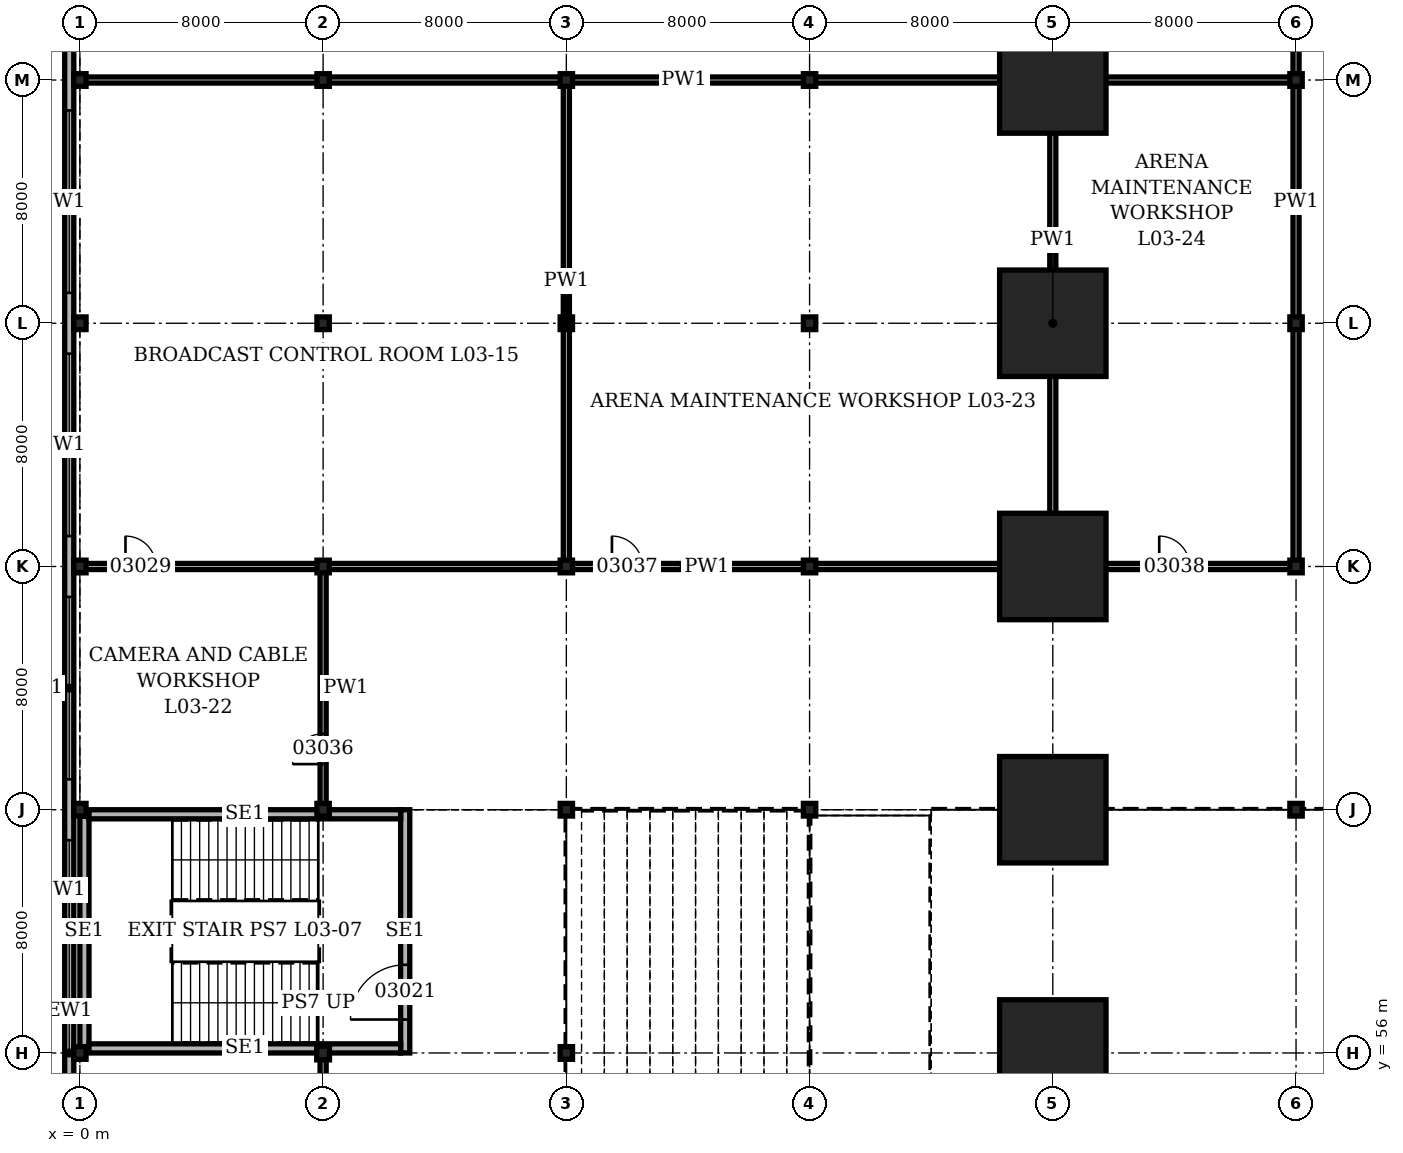
"""IFC4 building model, lengths in metres.
Left out: names, types, materials, properties, quantities, classifications, styles, units other than length and angle.
Written with IfcOpenShell. Run it as: python <this file> out.ifc"""

import sys

from ifc_helpers import new_model, si_unit, direction, frame, frame_2d, origin, origin_2d, place, context, subcontext, project, spatial, rectangle, hollow_rectangle, i_section, extrude, element, fill, save


model = new_model("IFC4")
c1 = context("Model", 3, precision=1e-05, world=origin(), true_north=direction((0.0, 1.0)))
c2 = subcontext(c1, "Body", "Model", "MODEL_VIEW")
j1 = project(units=[si_unit("LENGTHUNIT", "METRE"), si_unit("PLANEANGLEUNIT", "RADIAN")], contexts=[c1])
p1 = place(None, origin())
s1 = spatial("IfcSite", under=j1, at=p1, CompositionType="ELEMENT")
p2 = place(p1, origin())
s2 = spatial("IfcBuilding", under=s1, at=p2, CompositionType="ELEMENT")
p3 = place(p2, frame((0.0, 0.0, 14.9)))
s3 = spatial("IfcBuildingStorey", under=s2, at=p3, CompositionType="ELEMENT", Elevation=14.9)
for number, where, z_axis, x_axis in (
    (1, (0.0, 56.0, 0.0), (0.0, 0.0, 1.0), (1.0, 0.0, 0.0)),
    (2, (0.0, 64.0, 0.0), (0.0, 0.0, 1.0), (1.0, 0.0, 0.0)),
    (3, (0.0, 72.0, 0.0), (0.0, 0.0, 1.0), (1.0, 0.0, 0.0)),
    (4, (0.0, 80.0, 0.0), (0.0, 0.0, 1.0), (1.0, 0.0, 0.0)),
    (5, (0.0, 88.0, 0.0), (0.0, 0.0, 1.0), (1.0, 0.0, 0.0)),
):
    element("IfcColumn", number, at=place(p3, frame(where, z_axis=z_axis, x_axis=x_axis)), inside=s3, PredefinedType="COLUMN", context=c2, shape_type="SweptSolid", body=[
        extrude(i_section(OverallWidth=0.406, OverallDepth=0.417, WebThickness=0.03, FlangeThickness=0.048, at=origin_2d()), origin(), (0.0, 0.0, 1.0), 5.0),
    ])
p4 = place(p3, frame((8.0, 56.0, 0.0), z_axis=(0.0, 0.0, 1.0), x_axis=(1.0, 0.0, 0.0)))
e6 = element("IfcColumn", 6, at=p4, inside=s3, PredefinedType="COLUMN", context=c2, shape_type="SweptSolid", body=[
    extrude(i_section(OverallWidth=0.419, OverallDepth=0.455, WebThickness=0.042, FlangeThickness=0.068, at=origin_2d()), origin(), (0.0, 0.0, 1.0), 5.0),
])
for number, where, z_axis, x_axis in (
    (7, (8.0, 64.0, 0.0), (0.0, 0.0, 1.0), (1.0, 0.0, 0.0)),
    (8, (8.0, 72.0, 0.0), (0.0, 0.0, 1.0), (1.0, 0.0, 0.0)),
    (9, (8.0, 80.0, 0.0), (0.0, 0.0, 1.0), (1.0, 0.0, 0.0)),
    (10, (8.0, 88.0, 0.0), (0.0, 0.0, 1.0), (1.0, 0.0, 0.0)),
    (11, (16.0, 56.0, 0.0), (0.0, 0.0, 1.0), (1.0, 0.0, 0.0)),
    (12, (16.0, 64.0, 0.0), (0.0, 0.0, 1.0), (1.0, 0.0, 0.0)),
    (13, (16.0, 72.0, 0.0), (0.0, 0.0, 1.0), (1.0, 0.0, 0.0)),
    (14, (16.0, 80.0, 0.0), (0.0, 0.0, 1.0), (1.0, 0.0, 0.0)),
    (15, (16.0, 88.0, 0.0), (0.0, 0.0, 1.0), (1.0, 0.0, 0.0)),
    (16, (24.0, 64.0, 0.0), (0.0, 0.0, 1.0), (1.0, 0.0, 0.0)),
    (17, (24.0, 72.0, 0.0), (0.0, 0.0, 1.0), (1.0, 0.0, 0.0)),
    (18, (24.0, 80.0, 0.0), (0.0, 0.0, 1.0), (1.0, 0.0, 0.0)),
    (19, (24.0, 88.0, 0.0), (0.0, 0.0, 1.0), (1.0, 0.0, 0.0)),
):
    element("IfcColumn", number, at=place(p3, frame(where, z_axis=z_axis, x_axis=x_axis)), inside=s3, PredefinedType="COLUMN", context=c2, shape_type="SweptSolid", body=[
        extrude(i_section(OverallWidth=0.406, OverallDepth=0.417, WebThickness=0.03, FlangeThickness=0.048, at=origin_2d()), origin(), (0.0, 0.0, 1.0), 5.0),
    ])
for number, where, z_axis, x_axis in (
    (20, (32.0, 56.0, 0.0), (0.0, 0.0, 1.0), (1.0, 0.0, 0.0)),
    (21, (32.0, 64.0, 0.0), (0.0, 0.0, 1.0), (1.0, 0.0, 0.0)),
    (22, (32.0, 72.0, 0.0), (0.0, 0.0, 1.0), (1.0, 0.0, 0.0)),
    (23, (32.0, 80.0, 0.0), (0.0, 0.0, 1.0), (1.0, 0.0, 0.0)),
    (24, (32.0, 88.0, 0.0), (0.0, 0.0, 1.0), (1.0, 0.0, 0.0)),
):
    element("IfcColumn", number, at=place(p3, frame(where, z_axis=z_axis, x_axis=x_axis)), inside=s3, PredefinedType="COLUMN", context=c2, shape_type="SweptSolid", body=[
        extrude(hollow_rectangle(XDim=3.5, YDim=3.5, WallThickness=0.5, at=origin_2d()), origin(), (0.0, 0.0, 1.0), 5.0),
    ])
for number, where, z_axis, x_axis in (
    (25, (40.0, 64.0, 0.0), (0.0, 0.0, 1.0), (1.0, 0.0, 0.0)),
    (26, (40.0, 72.0, 0.0), (0.0, 0.0, 1.0), (1.0, 0.0, 0.0)),
    (27, (40.0, 80.0, 0.0), (0.0, 0.0, 1.0), (1.0, 0.0, 0.0)),
    (28, (40.0, 88.0, 0.0), (0.0, 0.0, 1.0), (1.0, 0.0, 0.0)),
):
    element("IfcColumn", number, at=place(p3, frame(where, z_axis=z_axis, x_axis=x_axis)), inside=s3, PredefinedType="COLUMN", context=c2, shape_type="SweptSolid", body=[
        extrude(i_section(OverallWidth=0.406, OverallDepth=0.417, WebThickness=0.03, FlangeThickness=0.048, at=origin_2d()), origin(), (0.0, 0.0, 1.0), 5.0),
    ])
p5 = place(p3, frame((-0.35, 112.35, 0.0), z_axis=(0.0, 0.0, 1.0), x_axis=(0.0, -1.0, 0.0)))
e29 = element("IfcWall", 29, at=p5, inside=s3, PredefinedType="SOLIDWALL", context=c2, shape_type="SweptSolid", body=[
    extrude(rectangle(XDim=112.7, YDim=0.3, at=frame_2d((56.35, 0.0))), origin(), (0.0, 0.0, 1.0), 5.0),
])
p6 = place(p5, frame((1.35, 0.0, 1.0)))
e30 = element("IfcOpeningElement", 30, at=p6, cuts=e29, PredefinedType="OPENING", context=c2, shape_type="SweptSolid", body=[
    extrude(rectangle(XDim=6.0, YDim=1.5, at=frame_2d((3.0, 0.75))), frame((0.0, 0.16, 0.0), z_axis=(0.0, -1.0, 0.0), x_axis=(1.0, 0.0, 0.0)), (0.0, 0.0, 1.0), 0.32),
])
p7 = place(p5, frame((9.35, 0.0, 1.0)))
e31 = element("IfcOpeningElement", 31, at=p7, cuts=e29, PredefinedType="OPENING", context=c2, shape_type="SweptSolid", body=[
    extrude(rectangle(XDim=6.0, YDim=1.5, at=frame_2d((3.0, 0.75))), frame((0.0, 0.16, 0.0), z_axis=(0.0, -1.0, 0.0), x_axis=(1.0, 0.0, 0.0)), (0.0, 0.0, 1.0), 0.32),
])
p8 = place(p5, frame((17.35, 0.0, 1.0)))
e32 = element("IfcOpeningElement", 32, at=p8, cuts=e29, PredefinedType="OPENING", context=c2, shape_type="SweptSolid", body=[
    extrude(rectangle(XDim=6.0, YDim=1.5, at=frame_2d((3.0, 0.75))), frame((0.0, 0.16, 0.0), z_axis=(0.0, -1.0, 0.0), x_axis=(1.0, 0.0, 0.0)), (0.0, 0.0, 1.0), 0.32),
])
p9 = place(p5, frame((25.35, 0.0, 1.0)))
e33 = element("IfcOpeningElement", 33, at=p9, cuts=e29, PredefinedType="OPENING", context=c2, shape_type="SweptSolid", body=[
    extrude(rectangle(XDim=6.0, YDim=1.5, at=frame_2d((3.0, 0.75))), frame((0.0, 0.16, 0.0), z_axis=(0.0, -1.0, 0.0), x_axis=(1.0, 0.0, 0.0)), (0.0, 0.0, 1.0), 0.32),
])
p10 = place(p5, frame((33.35, 0.0, 1.0)))
e34 = element("IfcOpeningElement", 34, at=p10, cuts=e29, PredefinedType="OPENING", context=c2, shape_type="SweptSolid", body=[
    extrude(rectangle(XDim=6.0, YDim=1.5, at=frame_2d((3.0, 0.75))), frame((0.0, 0.16, 0.0), z_axis=(0.0, -1.0, 0.0), x_axis=(1.0, 0.0, 0.0)), (0.0, 0.0, 1.0), 0.32),
])
p11 = place(p5, frame((41.35, 0.0, 1.0)))
e35 = element("IfcOpeningElement", 35, at=p11, cuts=e29, PredefinedType="OPENING", context=c2, shape_type="SweptSolid", body=[
    extrude(rectangle(XDim=6.0, YDim=1.5, at=frame_2d((3.0, 0.75))), frame((0.0, 0.16, 0.0), z_axis=(0.0, -1.0, 0.0), x_axis=(1.0, 0.0, 0.0)), (0.0, 0.0, 1.0), 0.32),
])
p12 = place(p5, frame((49.35, 0.0, 1.0)))
e36 = element("IfcOpeningElement", 36, at=p12, cuts=e29, PredefinedType="OPENING", context=c2, shape_type="SweptSolid", body=[
    extrude(rectangle(XDim=6.0, YDim=1.5, at=frame_2d((3.0, 0.75))), frame((0.0, 0.16, 0.0), z_axis=(0.0, -1.0, 0.0), x_axis=(1.0, 0.0, 0.0)), (0.0, 0.0, 1.0), 0.32),
])
p13 = place(p5, frame((57.35, 0.0, 1.0)))
e37 = element("IfcOpeningElement", 37, at=p13, cuts=e29, PredefinedType="OPENING", context=c2, shape_type="SweptSolid", body=[
    extrude(rectangle(XDim=6.0, YDim=1.5, at=frame_2d((3.0, 0.75))), frame((0.0, 0.16, 0.0), z_axis=(0.0, -1.0, 0.0), x_axis=(1.0, 0.0, 0.0)), (0.0, 0.0, 1.0), 0.32),
])
p14 = place(p5, frame((65.35, 0.0, 1.0)))
e38 = element("IfcOpeningElement", 38, at=p14, cuts=e29, PredefinedType="OPENING", context=c2, shape_type="SweptSolid", body=[
    extrude(rectangle(XDim=6.0, YDim=1.5, at=frame_2d((3.0, 0.75))), frame((0.0, 0.16, 0.0), z_axis=(0.0, -1.0, 0.0), x_axis=(1.0, 0.0, 0.0)), (0.0, 0.0, 1.0), 0.32),
])
p15 = place(p5, frame((73.35, 0.0, 1.0)))
e39 = element("IfcOpeningElement", 39, at=p15, cuts=e29, PredefinedType="OPENING", context=c2, shape_type="SweptSolid", body=[
    extrude(rectangle(XDim=6.0, YDim=1.5, at=frame_2d((3.0, 0.75))), frame((0.0, 0.16, 0.0), z_axis=(0.0, -1.0, 0.0), x_axis=(1.0, 0.0, 0.0)), (0.0, 0.0, 1.0), 0.32),
])
p16 = place(p5, frame((81.35, 0.0, 1.0)))
e40 = element("IfcOpeningElement", 40, at=p16, cuts=e29, PredefinedType="OPENING", context=c2, shape_type="SweptSolid", body=[
    extrude(rectangle(XDim=6.0, YDim=1.5, at=frame_2d((3.0, 0.75))), frame((0.0, 0.16, 0.0), z_axis=(0.0, -1.0, 0.0), x_axis=(1.0, 0.0, 0.0)), (0.0, 0.0, 1.0), 0.32),
])
p17 = place(p5, frame((89.35, 0.0, 1.0)))
e41 = element("IfcOpeningElement", 41, at=p17, cuts=e29, PredefinedType="OPENING", context=c2, shape_type="SweptSolid", body=[
    extrude(rectangle(XDim=6.0, YDim=1.5, at=frame_2d((3.0, 0.75))), frame((0.0, 0.16, 0.0), z_axis=(0.0, -1.0, 0.0), x_axis=(1.0, 0.0, 0.0)), (0.0, 0.0, 1.0), 0.32),
])
p18 = place(p5, frame((97.35, 0.0, 1.0)))
e42 = element("IfcOpeningElement", 42, at=p18, cuts=e29, PredefinedType="OPENING", context=c2, shape_type="SweptSolid", body=[
    extrude(rectangle(XDim=6.0, YDim=1.5, at=frame_2d((3.0, 0.75))), frame((0.0, 0.16, 0.0), z_axis=(0.0, -1.0, 0.0), x_axis=(1.0, 0.0, 0.0)), (0.0, 0.0, 1.0), 0.32),
])
p19 = place(p5, frame((105.35, 0.0, 1.0)))
e43 = element("IfcOpeningElement", 43, at=p19, cuts=e29, PredefinedType="OPENING", context=c2, shape_type="SweptSolid", body=[
    extrude(rectangle(XDim=6.0, YDim=1.5, at=frame_2d((3.0, 0.75))), frame((0.0, 0.16, 0.0), z_axis=(0.0, -1.0, 0.0), x_axis=(1.0, 0.0, 0.0)), (0.0, 0.0, 1.0), 0.32),
])
p20 = place(p3, frame((0.15, 56.208, 0.0), z_axis=(0.0, 0.0, 1.0), x_axis=(0.0, 1.0, 0.0)))
e44 = element("IfcWall", 44, at=p20, inside=s3, PredefinedType="SOLIDWALL", context=c2, shape_type="SweptSolid", body=[
    extrude(rectangle(XDim=7.583, YDim=0.3, at=frame_2d((3.792, 0.0))), origin(), (0.0, 0.0, 1.0), 4.8),
])
p21 = place(p3, frame((10.7, 56.0, 0.0), z_axis=(0.0, 0.0, 1.0), x_axis=(0.0, 1.0, 0.0)))
e45 = element("IfcWall", 45, at=p21, inside=s3, PredefinedType="SOLIDWALL", context=c2, shape_type="SweptSolid", body=[
    extrude(rectangle(XDim=8.0, YDim=0.3, at=frame_2d((4.0, 0.0))), origin(), (0.0, 0.0, 1.0), 4.8),
])
p22 = place(p21, frame((1.1, 0.0, 0.0)))
e46 = element("IfcOpeningElement", 46, at=p22, cuts=e45, PredefinedType="OPENING", context=c2, shape_type="SweptSolid", body=[
    extrude(rectangle(XDim=1.8, YDim=2.1, at=frame_2d((0.9, 1.05))), frame((0.0, 0.16, 0.0), z_axis=(0.0, -1.0, 0.0), x_axis=(1.0, 0.0, 0.0)), (0.0, 0.0, 1.0), 0.32),
])
for number, where, z_axis, x_axis in (
    (47, (0.3, 56.15, 0.0), (0.0, 0.0, 1.0), (1.0, 0.0, 0.0)),
    (48, (0.3, 63.85, 0.0), (0.0, 0.0, 1.0), (1.0, 0.0, 0.0)),
):
    element("IfcWall", number, at=place(p3, frame(where, z_axis=z_axis, x_axis=x_axis)), inside=s3, PredefinedType="SOLIDWALL", context=c2, shape_type="SweptSolid", body=[
        extrude(rectangle(XDim=10.25, YDim=0.3, at=frame_2d((5.125, 0.0))), origin(), (0.0, 0.0, 1.0), 4.8),
    ])
p23 = place(p3, frame((-0.15, 72.0, 0.0), z_axis=(0.0, 0.0, 1.0), x_axis=(1.0, 0.0, 0.0)))
e49 = element("IfcWall", 49, at=p23, inside=s3, PredefinedType="PARTITIONING", context=c2, shape_type="SweptSolid", body=[
    extrude(rectangle(XDim=40.05, YDim=0.2, at=frame_2d((20.025, 0.0))), origin(), (0.0, 0.0, 1.0), 4.028),
])
p24 = place(p23, frame((1.65, 0.0, 0.0)))
e50 = element("IfcOpeningElement", 50, at=p24, cuts=e49, PredefinedType="OPENING", context=c2, shape_type="SweptSolid", body=[
    extrude(rectangle(XDim=1.0, YDim=2.1, at=frame_2d((0.5, 1.05))), frame((0.0, 0.11, 0.0), z_axis=(0.0, -1.0, 0.0), x_axis=(1.0, 0.0, 0.0)), (0.0, 0.0, 1.0), 0.22),
])
p25 = place(p23, frame((17.65, 0.0, 0.0)))
e51 = element("IfcOpeningElement", 51, at=p25, cuts=e49, PredefinedType="OPENING", context=c2, shape_type="SweptSolid", body=[
    extrude(rectangle(XDim=1.0, YDim=2.1, at=frame_2d((0.5, 1.05))), frame((0.0, 0.11, 0.0), z_axis=(0.0, -1.0, 0.0), x_axis=(1.0, 0.0, 0.0)), (0.0, 0.0, 1.0), 0.22),
])
p26 = place(p23, frame((35.65, 0.0, 0.0)))
e52 = element("IfcOpeningElement", 52, at=p26, cuts=e49, PredefinedType="OPENING", context=c2, shape_type="SweptSolid", body=[
    extrude(rectangle(XDim=1.0, YDim=2.1, at=frame_2d((0.5, 1.05))), frame((0.0, 0.11, 0.0), z_axis=(0.0, -1.0, 0.0), x_axis=(1.0, 0.0, 0.0)), (0.0, 0.0, 1.0), 0.22),
])
p27 = place(p3, frame((-0.15, 88.0, 0.0), z_axis=(0.0, 0.0, 1.0), x_axis=(1.0, 0.0, 0.0)))
e53 = element("IfcWall", 53, at=p27, inside=s3, PredefinedType="PARTITIONING", context=c2, shape_type="SweptSolid", body=[
    extrude(rectangle(XDim=40.05, YDim=0.2, at=frame_2d((20.025, 0.0))), origin(), (0.0, 0.0, 1.0), 4.028),
])
p28 = place(p3, frame((8.0, 48.1, 0.0), z_axis=(0.0, 0.0, 1.0), x_axis=(0.0, 1.0, 0.0)))
e54 = element("IfcWall", 54, at=p28, inside=s3, PredefinedType="PARTITIONING", context=c2, shape_type="SweptSolid", body=[
    extrude(rectangle(XDim=7.8, YDim=0.2, at=frame_2d((3.9, 0.0))), origin(), (0.0, 0.0, 1.0), 4.028),
])
p29 = place(p28, frame((1.4, 0.0, 0.0)))
e55 = element("IfcOpeningElement", 55, at=p29, cuts=e54, PredefinedType="OPENING", context=c2, shape_type="SweptSolid", body=[
    extrude(rectangle(XDim=1.0, YDim=2.1, at=frame_2d((0.5, 1.05))), frame((0.0, 0.11, 0.0), z_axis=(0.0, -1.0, 0.0), x_axis=(1.0, 0.0, 0.0)), (0.0, 0.0, 1.0), 0.22),
])
p30 = place(p3, frame((8.0, 64.1, 0.0), z_axis=(0.0, 0.0, 1.0), x_axis=(0.0, 1.0, 0.0)))
e56 = element("IfcWall", 56, at=p30, inside=s3, PredefinedType="PARTITIONING", context=c2, shape_type="SweptSolid", body=[
    extrude(rectangle(XDim=7.8, YDim=0.2, at=frame_2d((3.9, 0.0))), origin(), (0.0, 0.0, 1.0), 4.028),
])
p31 = place(p30, frame((1.4, 0.0, 0.0)))
e57 = element("IfcOpeningElement", 57, at=p31, cuts=e56, PredefinedType="OPENING", context=c2, shape_type="SweptSolid", body=[
    extrude(rectangle(XDim=1.0, YDim=2.1, at=frame_2d((0.5, 1.05))), frame((0.0, 0.11, 0.0), z_axis=(0.0, -1.0, 0.0), x_axis=(1.0, 0.0, 0.0)), (0.0, 0.0, 1.0), 0.22),
])
for number, where, z_axis, x_axis in (
    (58, (16.0, 72.1, 0.0), (0.0, 0.0, 1.0), (0.0, 1.0, 0.0)),
    (59, (32.0, 72.1, 0.0), (0.0, 0.0, 1.0), (0.0, 1.0, 0.0)),
):
    element("IfcWall", number, at=place(p3, frame(where, z_axis=z_axis, x_axis=x_axis)), inside=s3, PredefinedType="PARTITIONING", context=c2, shape_type="SweptSolid", body=[
        extrude(rectangle(XDim=15.8, YDim=0.2, at=frame_2d((7.9, 0.0))), origin(), (0.0, 0.0, 1.0), 4.028),
    ])
p32 = place(p3, frame((40.0, 72.1, 0.0), z_axis=(0.0, 0.0, 1.0), x_axis=(0.0, 1.0, 0.0)))
e60 = element("IfcWall", 60, at=p32, inside=s3, PredefinedType="PARTITIONING", context=c2, shape_type="SweptSolid", body=[
    extrude(rectangle(XDim=23.8, YDim=0.2, at=frame_2d((11.9, 0.0))), origin(), (0.0, 0.0, 1.0), 4.028),
])
p33 = place(p32, frame((17.4, 0.0, 0.0)))
e61 = element("IfcOpeningElement", 61, at=p33, cuts=e60, PredefinedType="OPENING", context=c2, shape_type="SweptSolid", body=[
    extrude(rectangle(XDim=1.0, YDim=2.1, at=frame_2d((0.5, 1.05))), frame((0.0, 0.11, 0.0), z_axis=(0.0, -1.0, 0.0), x_axis=(1.0, 0.0, 0.0)), (0.0, 0.0, 1.0), 0.22),
])
p34 = place(p9, origin())
e62 = element("IfcWindow", 62, at=p34, inside=s3, PartitioningType="SINGLE_PANEL", PredefinedType="WINDOW", context=c2, shape_type="SweptSolid", body=[
    extrude(rectangle(XDim=6.0, YDim=1.5, at=frame_2d((3.0, 0.75))), frame((0.0, 0.03, 0.0), z_axis=(0.0, -1.0, 0.0), x_axis=(1.0, 0.0, 0.0)), (0.0, 0.0, 1.0), 0.06),
])
fill(e33, e62)
p35 = place(p10, origin())
e63 = element("IfcWindow", 63, at=p35, inside=s3, PartitioningType="SINGLE_PANEL", PredefinedType="WINDOW", context=c2, shape_type="SweptSolid", body=[
    extrude(rectangle(XDim=6.0, YDim=1.5, at=frame_2d((3.0, 0.75))), frame((0.0, 0.03, 0.0), z_axis=(0.0, -1.0, 0.0), x_axis=(1.0, 0.0, 0.0)), (0.0, 0.0, 1.0), 0.06),
])
fill(e34, e63)
p36 = place(p11, origin())
e64 = element("IfcWindow", 64, at=p36, inside=s3, PartitioningType="SINGLE_PANEL", PredefinedType="WINDOW", context=c2, shape_type="SweptSolid", body=[
    extrude(rectangle(XDim=6.0, YDim=1.5, at=frame_2d((3.0, 0.75))), frame((0.0, 0.03, 0.0), z_axis=(0.0, -1.0, 0.0), x_axis=(1.0, 0.0, 0.0)), (0.0, 0.0, 1.0), 0.06),
])
fill(e35, e64)
p37 = place(p12, origin())
e65 = element("IfcWindow", 65, at=p37, inside=s3, PartitioningType="SINGLE_PANEL", PredefinedType="WINDOW", context=c2, shape_type="SweptSolid", body=[
    extrude(rectangle(XDim=6.0, YDim=1.5, at=frame_2d((3.0, 0.75))), frame((0.0, 0.03, 0.0), z_axis=(0.0, -1.0, 0.0), x_axis=(1.0, 0.0, 0.0)), (0.0, 0.0, 1.0), 0.06),
])
fill(e36, e65)
p38 = place(p22, origin())
e66 = element("IfcDoor", 66, at=p38, inside=s3, OperationType="DOUBLE_DOOR_SINGLE_SWING", PredefinedType="DOOR", context=c2, shape_type="SweptSolid", body=[
    extrude(rectangle(XDim=1.8, YDim=2.1, at=frame_2d((0.9, 1.05))), frame((0.0, 0.15, 0.0), z_axis=(0.0, -1.0, 0.0), x_axis=(1.0, 0.0, 0.0)), (0.0, 0.0, 1.0), 0.3),
])
fill(e46, e66)
p39 = place(p24, origin())
e67 = element("IfcDoor", 67, at=p39, inside=s3, OperationType="SINGLE_SWING_LEFT", PredefinedType="DOOR", context=c2, shape_type="SweptSolid", body=[
    extrude(rectangle(XDim=1.0, YDim=2.1, at=frame_2d((0.5, 1.05))), frame((0.0, 0.1, 0.0), z_axis=(0.0, -1.0, 0.0), x_axis=(1.0, 0.0, 0.0)), (0.0, 0.0, 1.0), 0.199),
])
fill(e50, e67)
p40 = place(p31, origin())
e68 = element("IfcDoor", 68, at=p40, inside=s3, OperationType="SINGLE_SWING_LEFT", PredefinedType="DOOR", context=c2, shape_type="SweptSolid", body=[
    extrude(rectangle(XDim=1.0, YDim=2.1, at=frame_2d((0.5, 1.05))), frame((0.0, 0.1, 0.0), z_axis=(0.0, -1.0, 0.0), x_axis=(1.0, 0.0, 0.0)), (0.0, 0.0, 1.0), 0.199),
])
fill(e57, e68)
p41 = place(p25, origin())
e69 = element("IfcDoor", 69, at=p41, inside=s3, OperationType="SINGLE_SWING_LEFT", PredefinedType="DOOR", context=c2, shape_type="SweptSolid", body=[
    extrude(rectangle(XDim=1.0, YDim=2.1, at=frame_2d((0.5, 1.05))), frame((0.0, 0.1, 0.0), z_axis=(0.0, -1.0, 0.0), x_axis=(1.0, 0.0, 0.0)), (0.0, 0.0, 1.0), 0.199),
])
fill(e51, e69)
p42 = place(p26, origin())
e70 = element("IfcDoor", 70, at=p42, inside=s3, OperationType="SINGLE_SWING_LEFT", PredefinedType="DOOR", context=c2, shape_type="SweptSolid", body=[
    extrude(rectangle(XDim=1.0, YDim=2.1, at=frame_2d((0.5, 1.05))), frame((0.0, 0.1, 0.0), z_axis=(0.0, -1.0, 0.0), x_axis=(1.0, 0.0, 0.0)), (0.0, 0.0, 1.0), 0.199),
])
fill(e52, e70)
save(model, sys.argv[1])
